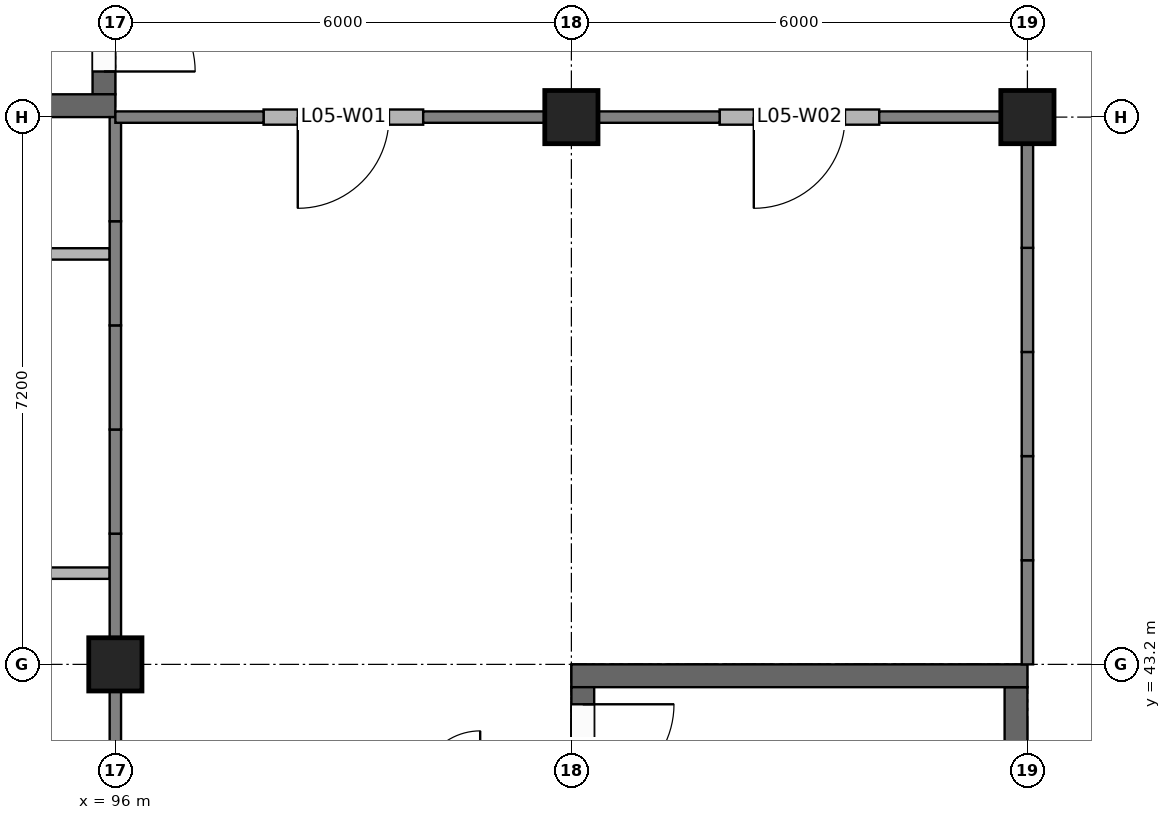
"""IFC4 building model, lengths in metres.
Left out: names, types, materials, properties, quantities, classifications, styles, units other than length and angle.
Written with IfcOpenShell. Run it as: python <this file> out.ifc"""

import sys

from ifc_helpers import new_model, si_unit, direction, frame, frame_2d, origin, origin_2d, place, context, subcontext, project, spatial, rectangle, extrude, element, fill, save


model = new_model("IFC4")
c1 = context("Model", 3, precision=1e-05, world=origin(), true_north=direction((0.0, 1.0)))
c2 = subcontext(c1, "Body", "Model", "MODEL_VIEW")
j1 = project(units=[si_unit("LENGTHUNIT", "METRE"), si_unit("PLANEANGLEUNIT", "RADIAN")], contexts=[c1])
p1 = place(None, origin())
s1 = spatial("IfcSite", under=j1, at=p1, CompositionType="ELEMENT")
p2 = place(p1, origin())
s2 = spatial("IfcBuilding", under=s1, at=p2, CompositionType="ELEMENT")
p3 = place(p2, frame((0.0, 0.0, 21.0)))
s3 = spatial("IfcBuildingStorey", under=s2, at=p3, CompositionType="ELEMENT", Elevation=21.0)
p4 = place(p3, frame((102.0, 43.05, 0.0), z_axis=(0.0, 0.0, 1.0), x_axis=(1.0, 0.0, 0.0)))
e1 = element("IfcWall", 1, at=p4, inside=s3, PredefinedType="SHEAR", context=c2, shape_type="SweptSolid", body=[
    extrude(rectangle(XDim=6.0, YDim=0.3, at=frame_2d((3.0, 0.0))), origin(), (0.0, 0.0, 1.0), 2.75),
])
p5 = place(p3, frame((102.15, 36.3, 0.0), z_axis=(0.0, 0.0, 1.0), x_axis=(0.0, 1.0, 0.0)))
e2 = element("IfcWall", 2, at=p5, inside=s3, PredefinedType="SHEAR", context=c2, shape_type="SweptSolid", body=[
    extrude(rectangle(XDim=6.6, YDim=0.3, at=frame_2d((3.3, 0.0))), origin(), (0.0, 0.0, 1.0), 2.75),
])
p6 = place(p5, frame((5.175, 0.0, 0.0)))
e3 = element("IfcOpeningElement", 3, at=p6, cuts=e2, PredefinedType="OPENING", context=c2, shape_type="SweptSolid", body=[
    extrude(rectangle(XDim=1.2, YDim=2.1, at=frame_2d((0.6, 1.05))), frame((0.0, 0.16, 0.0), z_axis=(0.0, -1.0, 0.0), x_axis=(1.0, 0.0, 0.0)), (0.0, 0.0, 1.0), 0.32),
])
p7 = place(p3, frame((107.85, 36.3, 0.0), z_axis=(0.0, 0.0, 1.0), x_axis=(0.0, 1.0, 0.0)))
e4 = element("IfcWall", 4, at=p7, inside=s3, PredefinedType="SHEAR", context=c2, shape_type="SweptSolid", body=[
    extrude(rectangle(XDim=6.6, YDim=0.3, at=frame_2d((3.3, 0.0))), origin(), (0.0, 0.0, 1.0), 2.75),
])
p8 = place(p3, frame((90.0, 50.55, 0.0), z_axis=(0.0, 0.0, 1.0), x_axis=(1.0, 0.0, 0.0)))
e5 = element("IfcWall", 5, at=p8, inside=s3, PredefinedType="SHEAR", context=c2, shape_type="SweptSolid", body=[
    extrude(rectangle(XDim=6.0, YDim=0.3, at=frame_2d((3.0, 0.0))), origin(), (0.0, 0.0, 1.0), 2.4),
])
p9 = place(p8, frame((2.4, 0.0, 0.0)))
e6 = element("IfcOpeningElement", 6, at=p9, cuts=e5, PredefinedType="OPENING", context=c2, shape_type="SweptSolid", body=[
    extrude(rectangle(XDim=1.2, YDim=2.1, at=frame_2d((0.6, 1.05))), frame((0.0, 0.16, 0.0), z_axis=(0.0, -1.0, 0.0), x_axis=(1.0, 0.0, 0.0)), (0.0, 0.0, 1.0), 0.32),
])
p10 = place(p3, frame((95.85, 50.7, 0.0), z_axis=(0.0, 0.0, 1.0), x_axis=(0.0, 1.0, 0.0)))
e7 = element("IfcWall", 7, at=p10, inside=s3, PredefinedType="SHEAR", context=c2, shape_type="SweptSolid", body=[
    extrude(rectangle(XDim=6.6, YDim=0.3, at=frame_2d((3.3, 0.0))), origin(), (0.0, 0.0, 1.0), 2.4),
])
p11 = place(p10, frame((0.3, 0.0, 0.0)))
e8 = element("IfcOpeningElement", 8, at=p11, cuts=e7, PredefinedType="OPENING", context=c2, shape_type="SweptSolid", body=[
    extrude(rectangle(XDim=1.2, YDim=2.1, at=frame_2d((0.6, 1.05))), frame((0.0, 0.16, 0.0), z_axis=(0.0, -1.0, 0.0), x_axis=(1.0, 0.0, 0.0)), (0.0, 0.0, 1.0), 0.32),
])
p12 = place(p3, frame((96.0, 43.2, 0.0), z_axis=(0.0, 0.0, 1.0), x_axis=(1.0, 0.0, 0.0)))
e9 = element("IfcColumn", 9, at=p12, inside=s3, PredefinedType="COLUMN", context=c2, shape_type="SweptSolid", body=[
    extrude(rectangle(XDim=0.7, YDim=0.7, at=origin_2d()), origin(), (0.0, 0.0, 1.0), 2.247),
])
for number, where, z_axis, x_axis in (
    (10, (102.0, 50.4, 0.0), (0.0, 0.0, 1.0), (1.0, 0.0, 0.0)),
    (11, (108.0, 50.4, 0.0), (0.0, 0.0, 1.0), (1.0, 0.0, 0.0)),
):
    element("IfcColumn", number, at=place(p3, frame(where, z_axis=z_axis, x_axis=x_axis)), inside=s3, PredefinedType="COLUMN", context=c2, shape_type="SweptSolid", body=[
        extrude(rectangle(XDim=0.7, YDim=0.7, at=origin_2d()), origin(), (0.0, 0.0, 1.0), 3.714),
    ])
p13 = place(p3, frame((107.91, 50.42, 0.0), z_axis=(0.0, 0.0, 1.0), x_axis=(0.0, 1.0, 0.0)))
e12 = element("IfcWall", 12, at=p13, inside=s3, PredefinedType="PARAPET", context=c2, shape_type="SweptSolid", body=[
    extrude(rectangle(XDim=7.18, YDim=0.18, at=frame_2d((3.59, 0.0))), origin(), (0.0, 0.0, 1.0), 1.1),
])
p14 = place(p3, frame((97.95, 50.4, 0.0), z_axis=(0.0, 0.0, 1.0), x_axis=(1.0, 0.0, 0.0)))
e13 = element("IfcWall", 13, at=p14, inside=s3, PredefinedType="SOLIDWALL", context=c2, shape_type="SweptSolid", body=[
    extrude(rectangle(XDim=2.1, YDim=0.2, at=frame_2d((1.05, 0.0))), origin(), (0.0, 0.0, 1.0), 3.714),
])
p15 = place(p14, frame((0.45, 0.0, 0.0)))
e14 = element("IfcOpeningElement", 14, at=p15, cuts=e13, PredefinedType="OPENING", context=c2, shape_type="SweptSolid", body=[
    extrude(rectangle(XDim=1.2, YDim=2.4, at=frame_2d((0.6, 1.2))), frame((0.0, 0.11, 0.0), z_axis=(0.0, -1.0, 0.0), x_axis=(1.0, 0.0, 0.0)), (0.0, 0.0, 1.0), 0.22),
])
p16 = place(p3, frame((103.95, 50.4, 0.0), z_axis=(0.0, 0.0, 1.0), x_axis=(1.0, 0.0, 0.0)))
e15 = element("IfcWall", 15, at=p16, inside=s3, PredefinedType="SOLIDWALL", context=c2, shape_type="SweptSolid", body=[
    extrude(rectangle(XDim=2.1, YDim=0.2, at=frame_2d((1.05, 0.0))), origin(), (0.0, 0.0, 1.0), 3.714),
])
p17 = place(p16, frame((0.45, 0.0, 0.0)))
e16 = element("IfcOpeningElement", 16, at=p17, cuts=e15, PredefinedType="OPENING", context=c2, shape_type="SweptSolid", body=[
    extrude(rectangle(XDim=1.2, YDim=2.4, at=frame_2d((0.6, 1.2))), frame((0.0, 0.11, 0.0), z_axis=(0.0, -1.0, 0.0), x_axis=(1.0, 0.0, 0.0)), (0.0, 0.0, 1.0), 0.22),
])
p18 = place(p3, frame((90.15, 44.4, 0.0), z_axis=(0.0, 0.0, 1.0), x_axis=(1.0, 0.0, 0.0)))
e17 = element("IfcWall", 17, at=p18, inside=s3, PredefinedType="PARTITIONING", context=c2, shape_type="SweptSolid", body=[
    extrude(rectangle(XDim=5.775, YDim=0.15, at=frame_2d((2.888, 0.0))), origin(), (0.0, 0.0, 1.0), 2.75),
])
p19 = place(p18, frame((2.4, 0.0, 0.0)))
e18 = element("IfcOpeningElement", 18, at=p19, cuts=e17, PredefinedType="OPENING", context=c2, shape_type="SweptSolid", body=[
    extrude(rectangle(XDim=0.9, YDim=2.1, at=frame_2d((0.45, 1.05))), frame((0.0, 0.085, 0.0), z_axis=(0.0, -1.0, 0.0), x_axis=(1.0, 0.0, 0.0)), (0.0, 0.0, 1.0), 0.17),
])
p20 = place(p3, frame((90.15, 48.6, 0.0), z_axis=(0.0, 0.0, 1.0), x_axis=(1.0, 0.0, 0.0)))
e19 = element("IfcWall", 19, at=p20, inside=s3, PredefinedType="PARTITIONING", context=c2, shape_type="SweptSolid", body=[
    extrude(rectangle(XDim=5.775, YDim=0.15, at=frame_2d((2.888, 0.0))), origin(), (0.0, 0.0, 1.0), 2.75),
])
p21 = place(p20, frame((2.4, 0.0, 0.0)))
e20 = element("IfcOpeningElement", 20, at=p21, cuts=e19, PredefinedType="OPENING", context=c2, shape_type="SweptSolid", body=[
    extrude(rectangle(XDim=0.9, YDim=2.1, at=frame_2d((0.45, 1.05))), frame((0.0, 0.085, 0.0), z_axis=(0.0, -1.0, 0.0), x_axis=(1.0, 0.0, 0.0)), (0.0, 0.0, 1.0), 0.17),
])
p22 = place(p15, frame((1.2, 0.0, 0.0), z_axis=(0.0, 0.0, 1.0), x_axis=(-1.0, 0.0, 0.0)))
e21 = element("IfcDoor", 21, at=p22, inside=s3, OperationType="SINGLE_SWING_RIGHT", PredefinedType="DOOR", context=c2, shape_type="SweptSolid", body=[
    extrude(rectangle(XDim=1.2, YDim=2.4, at=frame_2d((0.6, 1.2))), frame((0.0, 0.025, 0.0), z_axis=(0.0, -1.0, 0.0), x_axis=(1.0, 0.0, 0.0)), (0.0, 0.0, 1.0), 0.05),
])
fill(e14, e21)
p23 = place(p17, frame((1.2, 0.0, 0.0), z_axis=(0.0, 0.0, 1.0), x_axis=(-1.0, 0.0, 0.0)))
e22 = element("IfcDoor", 22, at=p23, inside=s3, OperationType="SINGLE_SWING_RIGHT", PredefinedType="DOOR", context=c2, shape_type="SweptSolid", body=[
    extrude(rectangle(XDim=1.2, YDim=2.4, at=frame_2d((0.6, 1.2))), frame((0.0, 0.025, 0.0), z_axis=(0.0, -1.0, 0.0), x_axis=(1.0, 0.0, 0.0)), (0.0, 0.0, 1.0), 0.05),
])
fill(e16, e22)
p24 = place(p6, frame((1.2, 0.0, 0.0), z_axis=(0.0, 0.0, 1.0), x_axis=(-1.0, 0.0, 0.0)))
e23 = element("IfcDoor", 23, at=p24, inside=s3, OperationType="SINGLE_SWING_LEFT", PredefinedType="DOOR", context=c2, shape_type="SweptSolid", body=[
    extrude(rectangle(XDim=1.2, YDim=2.1, at=frame_2d((0.6, 1.05))), frame((0.0, 0.025, 0.0), z_axis=(0.0, -1.0, 0.0), x_axis=(1.0, 0.0, 0.0)), (0.0, 0.0, 1.0), 0.05),
])
fill(e3, e23)
p25 = place(p11, frame((1.2, 0.0, 0.0), z_axis=(0.0, 0.0, 1.0), x_axis=(-1.0, 0.0, 0.0)))
e24 = element("IfcDoor", 24, at=p25, inside=s3, OperationType="SINGLE_SWING_RIGHT", PredefinedType="DOOR", context=c2, shape_type="SweptSolid", body=[
    extrude(rectangle(XDim=1.2, YDim=2.1, at=frame_2d((0.6, 1.05))), frame((0.0, 0.025, 0.0), z_axis=(0.0, -1.0, 0.0), x_axis=(1.0, 0.0, 0.0)), (0.0, 0.0, 1.0), 0.05),
])
fill(e8, e24)
save(model, sys.argv[1])
